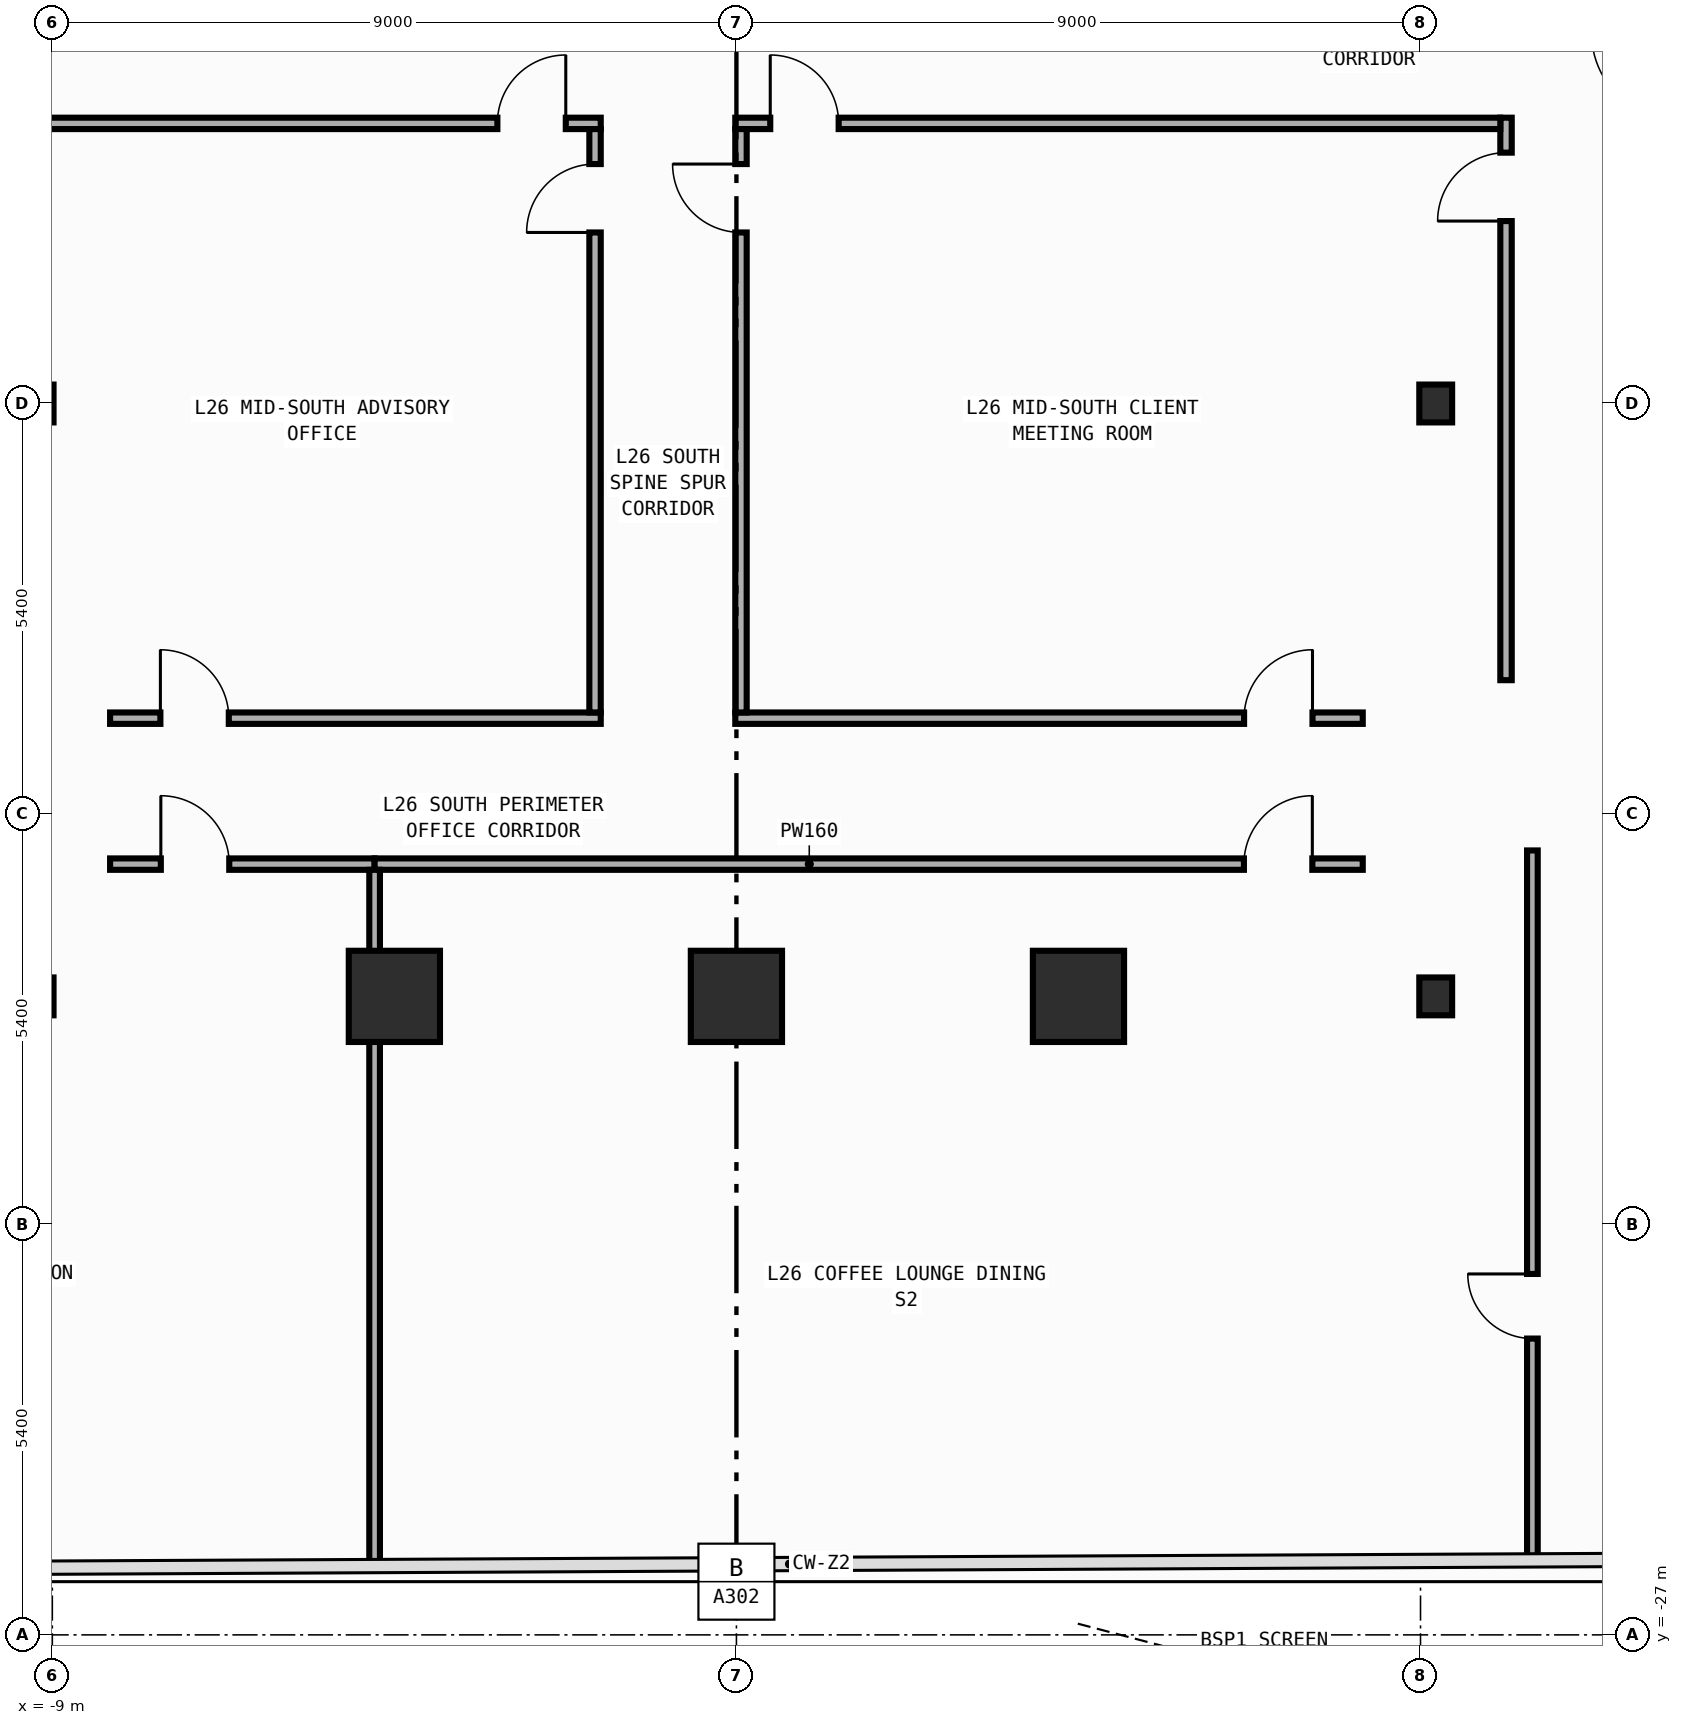
"""IFC4 building model, lengths in metres.
Left out: names, types, materials, properties, quantities, classifications, styles, units other than length and angle.
Written with IfcOpenShell. Run it as: python <this file> out.ifc"""

import sys

from ifc_helpers import new_model, si_unit, direction, frame, frame_2d, origin, origin_2d, place, context, subcontext, project, spatial, rectangle, i_section, extrude, element, fill, save


model = new_model("IFC4")
c1 = context("Model", 3, precision=1e-05, world=origin(), true_north=direction((0.0, 1.0)))
c2 = subcontext(c1, "Body", "Model", "MODEL_VIEW")
j1 = project(units=[si_unit("LENGTHUNIT", "METRE"), si_unit("PLANEANGLEUNIT", "RADIAN")], contexts=[c1])
p1 = place(None, origin())
s1 = spatial("IfcSite", under=j1, at=p1, CompositionType="ELEMENT")
p2 = place(p1, origin())
s2 = spatial("IfcBuilding", under=s1, at=p2, CompositionType="ELEMENT")
p3 = place(p2, frame((0.0, 0.0, 114.2)))
s3 = spatial("IfcBuildingStorey", under=s2, at=p3, CompositionType="ELEMENT", Elevation=114.2)
for number, where, z_axis, x_axis in (
    (1, (-9.2, -18.6, 0.0), (0.0, 0.0, 1.0), (1.0, 0.0, 0.0)),
    (2, (-9.2, -10.8, 0.0), (0.0, 0.0, 1.0), (1.0, 0.0, 0.0)),
    (3, (9.2, -18.6, 0.0), (0.0, 0.0, 1.0), (1.0, 0.0, 0.0)),
    (4, (9.2, -10.8, 0.0), (0.0, 0.0, 1.0), (1.0, 0.0, 0.0)),
):
    element("IfcColumn", number, at=place(p3, frame(where, z_axis=z_axis, x_axis=x_axis)), inside=s3, PredefinedType="COLUMN", context=c2, shape_type="SweptSolid", body=[
        extrude(i_section(OverallWidth=0.432, OverallDepth=0.498, WebThickness=0.045, FlangeThickness=0.07, FilletRadius=0.022, at=origin_2d()), origin(), (0.0, 0.0, 1.0), 4.2),
    ])
for number, where, z_axis, x_axis in (
    (5, (-4.5, -18.6, 0.0), (0.0, 0.0, 1.0), (1.0, 0.0, 0.0)),
    (6, (0.0, -18.6, 0.0), (0.0, 0.0, 1.0), (1.0, 0.0, 0.0)),
    (7, (4.5, -18.6, 0.0), (0.0, 0.0, 1.0), (1.0, 0.0, 0.0)),
):
    element("IfcColumn", number, at=place(p3, frame(where, z_axis=z_axis, x_axis=x_axis)), inside=s3, PredefinedType="COLUMN", context=c2, shape_type="SweptSolid", body=[
        extrude(rectangle(XDim=1.2, YDim=1.2, at=origin_2d()), origin(), (0.0, 0.0, 1.0), 4.2),
    ])
p4 = place(p3, frame((10.125, -14.44, 0.0), z_axis=(0.0, 0.0, 1.0), x_axis=(0.0, 1.0, 0.0)))
e8 = element("IfcWall", 8, at=p4, inside=s3, PredefinedType="PARTITIONING", context=c2, shape_type="SweptSolid", body=[
    extrude(rectangle(XDim=7.4, YDim=0.15, at=frame_2d((3.7, 0.0))), origin(), (0.0, 0.0, 1.0), 3.94),
])
p5 = place(p4, frame((6.04, 0.0, 0.0)))
e9 = element("IfcOpeningElement", 9, at=p5, cuts=e8, PredefinedType="OPENING", context=c2, shape_type="SweptSolid", body=[
    extrude(rectangle(XDim=0.9, YDim=2.15, at=frame_2d((0.45, 1.075))), frame((0.0, 0.085, 0.0), z_axis=(0.0, -1.0, 0.0), x_axis=(1.0, 0.0, 0.0)), (0.0, 0.0, 1.0), 0.17),
])
p6 = place(p3, frame((-10.05, -7.115, 0.0), z_axis=(0.0, 0.0, 1.0), x_axis=(1.0, 0.0, 0.0)))
e10 = element("IfcWall", 10, at=p6, inside=s3, PredefinedType="PARTITIONING", context=c2, shape_type="SweptSolid", body=[
    extrude(rectangle(XDim=8.265, YDim=0.15, at=frame_2d((4.133, 0.0))), origin(), (0.0, 0.0, 1.0), 3.94),
])
p7 = place(p6, frame((6.905, 0.0, 0.0)))
e11 = element("IfcOpeningElement", 11, at=p7, cuts=e10, PredefinedType="OPENING", context=c2, shape_type="SweptSolid", body=[
    extrude(rectangle(XDim=0.9, YDim=2.15, at=frame_2d((0.45, 1.075))), frame((0.0, 0.085, 0.0), z_axis=(0.0, -1.0, 0.0), x_axis=(1.0, 0.0, 0.0)), (0.0, 0.0, 1.0), 0.17),
])
p8 = place(p3, frame((-0.015, -7.115, 0.0), z_axis=(0.0, 0.0, 1.0), x_axis=(1.0, 0.0, 0.0)))
e12 = element("IfcWall", 12, at=p8, inside=s3, PredefinedType="PARTITIONING", context=c2, shape_type="SweptSolid", body=[
    extrude(rectangle(XDim=10.065, YDim=0.15, at=frame_2d((5.032, 0.0))), origin(), (0.0, 0.0, 1.0), 3.94),
])
p9 = place(p8, frame((0.46, 0.0, 0.0)))
e13 = element("IfcOpeningElement", 13, at=p9, cuts=e12, PredefinedType="OPENING", context=c2, shape_type="SweptSolid", body=[
    extrude(rectangle(XDim=0.9, YDim=2.15, at=frame_2d((0.45, 1.075))), frame((0.0, 0.085, 0.0), z_axis=(0.0, -1.0, 0.0), x_axis=(1.0, 0.0, 0.0)), (0.0, 0.0, 1.0), 0.17),
])
p10 = place(p3, frame((-8.24, -16.86, 0.0), z_axis=(0.0, 0.0, 1.0), x_axis=(1.0, 0.0, 0.0)))
e14 = element("IfcWall", 14, at=p10, inside=s3, PredefinedType="PARTITIONING", context=c2, shape_type="SweptSolid", body=[
    extrude(rectangle(XDim=3.48, YDim=0.15, at=frame_2d((1.74, 0.0))), origin(), (0.0, 0.0, 1.0), 3.94),
])
p11 = place(p10, frame((0.667, 0.0, 0.0)))
e15 = element("IfcOpeningElement", 15, at=p11, cuts=e14, PredefinedType="OPENING", context=c2, shape_type="SweptSolid", body=[
    extrude(rectangle(XDim=0.9, YDim=2.15, at=frame_2d((0.45, 1.075))), frame((0.0, 0.085, 0.0), z_axis=(0.0, -1.0, 0.0), x_axis=(1.0, 0.0, 0.0)), (0.0, 0.0, 1.0), 0.17),
])
p12 = place(p3, frame((-4.76, -16.86, 0.0), z_axis=(0.0, 0.0, 1.0), x_axis=(1.0, 0.0, 0.0)))
e16 = element("IfcWall", 16, at=p12, inside=s3, PredefinedType="PARTITIONING", context=c2, shape_type="SweptSolid", body=[
    extrude(rectangle(XDim=13.0, YDim=0.15, at=frame_2d((6.5, 0.0))), origin(), (0.0, 0.0, 1.0), 3.94),
])
p13 = place(p12, frame((11.437, 0.0, 0.0)))
e17 = element("IfcOpeningElement", 17, at=p13, cuts=e16, PredefinedType="OPENING", context=c2, shape_type="SweptSolid", body=[
    extrude(rectangle(XDim=0.9, YDim=2.15, at=frame_2d((0.45, 1.075))), frame((0.0, 0.085, 0.0), z_axis=(0.0, -1.0, 0.0), x_axis=(1.0, 0.0, 0.0)), (0.0, 0.0, 1.0), 0.17),
])
p14 = place(p3, frame((-8.24, -14.94, 0.0), z_axis=(0.0, 0.0, 1.0), x_axis=(1.0, 0.0, 0.0)))
e18 = element("IfcWall", 18, at=p14, inside=s3, PredefinedType="PARTITIONING", context=c2, shape_type="SweptSolid", body=[
    extrude(rectangle(XDim=6.455, YDim=0.15, at=frame_2d((3.228, 0.0))), origin(), (0.0, 0.0, 1.0), 3.94),
])
p15 = place(p14, frame((0.662, 0.0, 0.0)))
e19 = element("IfcOpeningElement", 19, at=p15, cuts=e18, PredefinedType="OPENING", context=c2, shape_type="SweptSolid", body=[
    extrude(rectangle(XDim=0.9, YDim=2.15, at=frame_2d((0.45, 1.075))), frame((0.0, 0.085, 0.0), z_axis=(0.0, -1.0, 0.0), x_axis=(1.0, 0.0, 0.0)), (0.0, 0.0, 1.0), 0.17),
])
p16 = place(p3, frame((-0.015, -14.94, 0.0), z_axis=(0.0, 0.0, 1.0), x_axis=(1.0, 0.0, 0.0)))
e20 = element("IfcWall", 20, at=p16, inside=s3, PredefinedType="PARTITIONING", context=c2, shape_type="SweptSolid", body=[
    extrude(rectangle(XDim=8.255, YDim=0.15, at=frame_2d((4.127, 0.0))), origin(), (0.0, 0.0, 1.0), 3.94),
])
p17 = place(p16, frame((6.694, 0.0, 0.0)))
e21 = element("IfcOpeningElement", 21, at=p17, cuts=e20, PredefinedType="OPENING", context=c2, shape_type="SweptSolid", body=[
    extrude(rectangle(XDim=0.9, YDim=2.15, at=frame_2d((0.45, 1.075))), frame((0.0, 0.085, 0.0), z_axis=(0.0, -1.0, 0.0), x_axis=(1.0, 0.0, 0.0)), (0.0, 0.0, 1.0), 0.17),
])
p18 = place(p3, frame((-1.86, -14.865, 0.0), z_axis=(0.0, 0.0, 1.0), x_axis=(0.0, 1.0, 0.0)))
e22 = element("IfcWall", 22, at=p18, inside=s3, PredefinedType="PARTITIONING", context=c2, shape_type="SweptSolid", body=[
    extrude(rectangle(XDim=7.675, YDim=0.15, at=frame_2d((3.837, 0.0))), origin(), (0.0, 0.0, 1.0), 3.94),
])
p19 = place(p18, frame((6.315, 0.0, 0.0)))
e23 = element("IfcOpeningElement", 23, at=p19, cuts=e22, PredefinedType="OPENING", context=c2, shape_type="SweptSolid", body=[
    extrude(rectangle(XDim=0.9, YDim=2.15, at=frame_2d((0.45, 1.075))), frame((0.0, 0.085, 0.0), z_axis=(0.0, -1.0, 0.0), x_axis=(1.0, 0.0, 0.0)), (0.0, 0.0, 1.0), 0.17),
])
p20 = place(p3, frame((0.06, -14.865, 0.0), z_axis=(0.0, 0.0, 1.0), x_axis=(0.0, 1.0, 0.0)))
e24 = element("IfcWall", 24, at=p20, inside=s3, PredefinedType="PARTITIONING", context=c2, shape_type="SweptSolid", body=[
    extrude(rectangle(XDim=7.675, YDim=0.15, at=frame_2d((3.837, 0.0))), origin(), (0.0, 0.0, 1.0), 3.94),
])
p21 = place(p20, frame((6.315, 0.0, 0.0)))
e25 = element("IfcOpeningElement", 25, at=p21, cuts=e24, PredefinedType="OPENING", context=c2, shape_type="SweptSolid", body=[
    extrude(rectangle(XDim=0.9, YDim=2.15, at=frame_2d((0.45, 1.075))), frame((0.0, 0.085, 0.0), z_axis=(0.0, -1.0, 0.0), x_axis=(1.0, 0.0, 0.0)), (0.0, 0.0, 1.0), 0.17),
])
p22 = place(p3, frame((-4.76, -26.09, 0.0), z_axis=(0.0, 0.0, 1.0), x_axis=(0.0, 1.0, 0.0)))
e26 = element("IfcWall", 26, at=p22, inside=s3, PredefinedType="PARTITIONING", context=c2, shape_type="SweptSolid", body=[
    extrude(rectangle(XDim=9.155, YDim=0.14, at=frame_2d((4.577, 0.0))), origin(), (0.0, 0.0, 1.0), 3.49),
])
p23 = place(p3, frame((10.472, -26.015, 0.0), z_axis=(0.0, 0.0, 1.0), x_axis=(0.0, 1.0, 0.0)))
e27 = element("IfcWall", 27, at=p23, inside=s3, PredefinedType="PARTITIONING", context=c2, shape_type="SweptSolid", body=[
    extrude(rectangle(XDim=9.335, YDim=0.14, at=frame_2d((4.668, 0.0))), origin(), (0.0, 0.0, 1.0), 3.94),
])
p24 = place(p23, frame((2.914, 0.0, 0.0)))
e28 = element("IfcOpeningElement", 28, at=p24, cuts=e27, PredefinedType="OPENING", context=c2, shape_type="SweptSolid", body=[
    extrude(rectangle(XDim=0.85, YDim=2.1, at=frame_2d((0.425, 1.05))), frame((0.0, 0.08, 0.0), z_axis=(0.0, -1.0, 0.0), x_axis=(1.0, 0.0, 0.0)), (0.0, 0.0, 1.0), 0.16),
])
p25 = place(p5, origin())
e29 = element("IfcDoor", 29, at=p25, inside=s3, OperationType="SINGLE_SWING_LEFT", PredefinedType="DOOR", context=c2, shape_type="SweptSolid", body=[
    extrude(rectangle(XDim=0.9, YDim=2.15, at=frame_2d((0.45, 1.075))), frame((0.0, 0.025, 0.0), z_axis=(0.0, -1.0, 0.0), x_axis=(1.0, 0.0, 0.0)), (0.0, 0.0, 1.0), 0.05),
])
fill(e9, e29)
p26 = place(p7, origin())
e30 = element("IfcDoor", 30, at=p26, inside=s3, OperationType="SINGLE_SWING_RIGHT", PredefinedType="DOOR", context=c2, shape_type="SweptSolid", body=[
    extrude(rectangle(XDim=0.9, YDim=2.15, at=frame_2d((0.45, 1.075))), frame((0.0, 0.025, 0.0), z_axis=(0.0, -1.0, 0.0), x_axis=(1.0, 0.0, 0.0)), (0.0, 0.0, 1.0), 0.05),
])
fill(e11, e30)
p27 = place(p9, origin())
e31 = element("IfcDoor", 31, at=p27, inside=s3, OperationType="SINGLE_SWING_LEFT", PredefinedType="DOOR", context=c2, shape_type="SweptSolid", body=[
    extrude(rectangle(XDim=0.9, YDim=2.15, at=frame_2d((0.45, 1.075))), frame((0.0, 0.025, 0.0), z_axis=(0.0, -1.0, 0.0), x_axis=(1.0, 0.0, 0.0)), (0.0, 0.0, 1.0), 0.05),
])
fill(e13, e31)
p28 = place(p11, origin())
e32 = element("IfcDoor", 32, at=p28, inside=s3, OperationType="SINGLE_SWING_LEFT", PredefinedType="DOOR", context=c2, shape_type="SweptSolid", body=[
    extrude(rectangle(XDim=0.9, YDim=2.15, at=frame_2d((0.45, 1.075))), frame((0.0, 0.025, 0.0), z_axis=(0.0, -1.0, 0.0), x_axis=(1.0, 0.0, 0.0)), (0.0, 0.0, 1.0), 0.05),
])
fill(e15, e32)
p29 = place(p13, origin())
e33 = element("IfcDoor", 33, at=p29, inside=s3, OperationType="SINGLE_SWING_RIGHT", PredefinedType="DOOR", context=c2, shape_type="SweptSolid", body=[
    extrude(rectangle(XDim=0.9, YDim=2.15, at=frame_2d((0.45, 1.075))), frame((0.0, 0.025, 0.0), z_axis=(0.0, -1.0, 0.0), x_axis=(1.0, 0.0, 0.0)), (0.0, 0.0, 1.0), 0.05),
])
fill(e17, e33)
p30 = place(p15, origin())
e34 = element("IfcDoor", 34, at=p30, inside=s3, OperationType="SINGLE_SWING_LEFT", PredefinedType="DOOR", context=c2, shape_type="SweptSolid", body=[
    extrude(rectangle(XDim=0.9, YDim=2.15, at=frame_2d((0.45, 1.075))), frame((0.0, 0.025, 0.0), z_axis=(0.0, -1.0, 0.0), x_axis=(1.0, 0.0, 0.0)), (0.0, 0.0, 1.0), 0.05),
])
fill(e19, e34)
p31 = place(p17, origin())
e35 = element("IfcDoor", 35, at=p31, inside=s3, OperationType="SINGLE_SWING_RIGHT", PredefinedType="DOOR", context=c2, shape_type="SweptSolid", body=[
    extrude(rectangle(XDim=0.9, YDim=2.15, at=frame_2d((0.45, 1.075))), frame((0.0, 0.025, 0.0), z_axis=(0.0, -1.0, 0.0), x_axis=(1.0, 0.0, 0.0)), (0.0, 0.0, 1.0), 0.05),
])
fill(e21, e35)
p32 = place(p19, origin())
e36 = element("IfcDoor", 36, at=p32, inside=s3, OperationType="SINGLE_SWING_LEFT", PredefinedType="DOOR", context=c2, shape_type="SweptSolid", body=[
    extrude(rectangle(XDim=0.9, YDim=2.15, at=frame_2d((0.45, 1.075))), frame((0.0, 0.025, 0.0), z_axis=(0.0, -1.0, 0.0), x_axis=(1.0, 0.0, 0.0)), (0.0, 0.0, 1.0), 0.05),
])
fill(e23, e36)
p33 = place(p21, origin())
e37 = element("IfcDoor", 37, at=p33, inside=s3, OperationType="SINGLE_SWING_RIGHT", PredefinedType="DOOR", context=c2, shape_type="SweptSolid", body=[
    extrude(rectangle(XDim=0.9, YDim=2.15, at=frame_2d((0.45, 1.075))), frame((0.0, 0.025, 0.0), z_axis=(0.0, -1.0, 0.0), x_axis=(1.0, 0.0, 0.0)), (0.0, 0.0, 1.0), 0.05),
])
fill(e25, e37)
p34 = place(p24, origin())
e38 = element("IfcDoor", 38, at=p34, inside=s3, OperationType="SINGLE_SWING_RIGHT", PredefinedType="DOOR", context=c2, shape_type="SweptSolid", body=[
    extrude(rectangle(XDim=0.85, YDim=2.1, at=frame_2d((0.425, 1.05))), frame((0.0, 0.025, 0.0), z_axis=(0.0, -1.0, 0.0), x_axis=(1.0, 0.0, 0.0)), (0.0, 0.0, 1.0), 0.05),
])
fill(e28, e38)
save(model, sys.argv[1])
